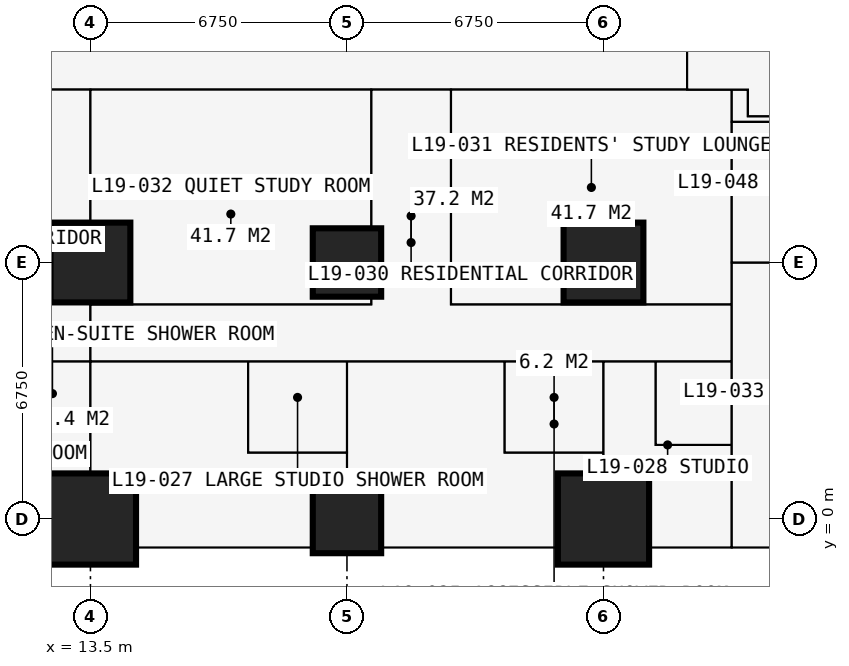
"""IFC4 building model, lengths in metres.
Left out: names, types, materials, properties, quantities, classifications, styles, units other than length and angle.
Written with IfcOpenShell. Run it as: python <this file> out.ifc"""

import sys

from ifc_helpers import new_model, si_unit, direction, frame, frame_2d, origin, origin_2d, place, context, subcontext, project, spatial, rectangle, extrude, element, fill, save


model = new_model("IFC4")
c1 = context("Model", 3, precision=1e-05, world=origin(), true_north=direction((0.0, 1.0)))
c2 = subcontext(c1, "Body", "Model", "MODEL_VIEW")
j1 = project(units=[si_unit("LENGTHUNIT", "METRE"), si_unit("PLANEANGLEUNIT", "RADIAN")], contexts=[c1])
p1 = place(None, origin())
s1 = spatial("IfcSite", under=j1, at=p1, CompositionType="ELEMENT")
p2 = place(p1, origin())
s2 = spatial("IfcBuilding", under=s1, at=p2, CompositionType="ELEMENT")
p3 = place(p2, frame((0.0, 0.0, 72.0)))
s3 = spatial("IfcBuildingStorey", under=s2, at=p3, CompositionType="ELEMENT", Elevation=72.0)
p4 = place(p3, frame((13.5, 0.0, 0.0), z_axis=(0.0, 0.0, 1.0), x_axis=(1.0, 0.0, 0.0)))
e1 = element("IfcColumn", 1, at=p4, inside=s3, PredefinedType="COLUMN", context=c2, shape_type="SweptSolid", body=[
    extrude(rectangle(XDim=2.4, YDim=2.4, at=origin_2d()), origin(), (0.0, 0.0, 1.0), 3.6),
])
p5 = place(p3, frame((13.5, 6.75, 0.0), z_axis=(0.0, 0.0, 1.0), x_axis=(1.0, 0.0, 0.0)))
e2 = element("IfcColumn", 2, at=p5, inside=s3, PredefinedType="COLUMN", context=c2, shape_type="SweptSolid", body=[
    extrude(rectangle(XDim=2.1, YDim=2.1, at=origin_2d()), origin(), (0.0, 0.0, 1.0), 3.6),
])
for number, where, z_axis, x_axis in (
    (3, (20.25, 0.0, 0.0), (0.0, 0.0, 1.0), (1.0, 0.0, 0.0)),
    (4, (20.25, 6.75, 0.0), (0.0, 0.0, 1.0), (1.0, 0.0, 0.0)),
):
    element("IfcColumn", number, at=place(p3, frame(where, z_axis=z_axis, x_axis=x_axis)), inside=s3, PredefinedType="COLUMN", context=c2, shape_type="SweptSolid", body=[
        extrude(rectangle(XDim=1.8, YDim=1.8, at=origin_2d()), origin(), (0.0, 0.0, 1.0), 3.6),
    ])
p6 = place(p3, frame((27.0, 0.0, 0.0), z_axis=(0.0, 0.0, 1.0), x_axis=(1.0, 0.0, 0.0)))
e5 = element("IfcColumn", 5, at=p6, inside=s3, PredefinedType="COLUMN", context=c2, shape_type="SweptSolid", body=[
    extrude(rectangle(XDim=2.4, YDim=2.4, at=origin_2d()), origin(), (0.0, 0.0, 1.0), 3.6),
])
p7 = place(p3, frame((27.0, 6.75, 0.0), z_axis=(0.0, 0.0, 1.0), x_axis=(1.0, 0.0, 0.0)))
e6 = element("IfcColumn", 6, at=p7, inside=s3, PredefinedType="COLUMN", context=c2, shape_type="SweptSolid", body=[
    extrude(rectangle(XDim=2.1, YDim=2.1, at=origin_2d()), origin(), (0.0, 0.0, 1.0), 3.6),
])
p8 = place(p3, frame((27.0, -0.75, 0.0), z_axis=(0.0, 0.0, 1.0), x_axis=(-1.0, 0.0, 0.0)))
e7 = element("IfcWall", 7, at=p8, inside=s3, PredefinedType="SOLIDWALL", context=c2, shape_type="SweptSolid", body=[
    extrude(rectangle(XDim=6.75, YDim=0.15, at=frame_2d((3.375, 0.0))), origin(), (0.0, 0.0, 1.0), 3.3),
])
p9 = place(p8, frame((1.262, 0.0, 0.0)))
e8 = element("IfcOpeningElement", 8, at=p9, cuts=e7, PredefinedType="OPENING", context=c2, shape_type="SweptSolid", body=[
    extrude(rectangle(XDim=1.0, YDim=2.2, at=frame_2d((0.5, 1.1))), frame((0.0, 0.085, 0.0), z_axis=(0.0, -1.0, 0.0), x_axis=(1.0, 0.0, 0.0)), (0.0, 0.0, 1.0), 0.17),
])
p10 = place(p8, frame((2.325, 0.0, 0.9)))
e9 = element("IfcOpeningElement", 9, at=p10, cuts=e7, PredefinedType="OPENING", context=c2, shape_type="SweptSolid", body=[
    extrude(rectangle(XDim=0.9, YDim=1.8, at=frame_2d((0.45, 0.9))), frame((0.0, 0.085, 0.0), z_axis=(0.0, -1.0, 0.0), x_axis=(1.0, 0.0, 0.0)), (0.0, 0.0, 1.0), 0.17),
])
p11 = place(p8, frame((4.788, 0.0, 0.0)))
e10 = element("IfcOpeningElement", 10, at=p11, cuts=e7, PredefinedType="OPENING", context=c2, shape_type="SweptSolid", body=[
    extrude(rectangle(XDim=1.0, YDim=2.2, at=frame_2d((0.5, 1.1))), frame((0.0, 0.085, 0.0), z_axis=(0.0, -1.0, 0.0), x_axis=(1.0, 0.0, 0.0)), (0.0, 0.0, 1.0), 0.17),
])
p12 = place(p8, frame((3.525, 0.0, 0.9)))
e11 = element("IfcOpeningElement", 11, at=p12, cuts=e7, PredefinedType="OPENING", context=c2, shape_type="SweptSolid", body=[
    extrude(rectangle(XDim=1.2, YDim=1.8, at=frame_2d((0.6, 0.9))), frame((0.0, 0.085, 0.0), z_axis=(0.0, -1.0, 0.0), x_axis=(1.0, 0.0, 0.0)), (0.0, 0.0, 1.0), 0.17),
])
p13 = place(p3, frame((23.625, -0.85, 0.0), z_axis=(0.0, 0.0, 1.0), x_axis=(0.0, -1.0, 0.0)))
e12 = element("IfcWall", 12, at=p13, inside=s3, PredefinedType="USERDEFINED", context=c2, shape_type="SweptSolid", body=[
    extrude(rectangle(XDim=2.2, YDim=1.0, at=frame_2d((1.1, 0.0))), origin(), (0.0, 0.0, 1.0), 0.9),
])
p14 = place(p3, frame((6.75, 4.15, 0.0), z_axis=(0.0, 0.0, 1.0), x_axis=(1.0, 0.0, 0.0)))
e13 = element("IfcWall", 13, at=p14, inside=s3, PredefinedType="PARTITIONING", context=c2, shape_type="SweptSolid", body=[
    extrude(rectangle(XDim=23.625, YDim=0.1, at=frame_2d((11.812, 0.0))), origin(), (0.0, 0.0, 1.0), 3.3),
])
p15 = place(p14, frame((0.2, 0.0, 0.0)))
e14 = element("IfcOpeningElement", 14, at=p15, cuts=e13, PredefinedType="OPENING", context=c2, shape_type="SweptSolid", body=[
    extrude(rectangle(XDim=0.95, YDim=2.2, at=frame_2d((0.475, 1.1))), frame((0.0, 0.06, 0.0), z_axis=(0.0, -1.0, 0.0), x_axis=(1.0, 0.0, 0.0)), (0.0, 0.0, 1.0), 0.12),
])
p16 = place(p14, frame((3.625, 0.0, 0.0)))
e15 = element("IfcOpeningElement", 15, at=p16, cuts=e13, PredefinedType="OPENING", context=c2, shape_type="SweptSolid", body=[
    extrude(rectangle(XDim=0.95, YDim=2.2, at=frame_2d((0.475, 1.1))), frame((0.0, 0.06, 0.0), z_axis=(0.0, -1.0, 0.0), x_axis=(1.0, 0.0, 0.0)), (0.0, 0.0, 1.0), 0.12),
])
p17 = place(p14, frame((15.1, 0.0, 0.0)))
e16 = element("IfcOpeningElement", 16, at=p17, cuts=e13, PredefinedType="OPENING", context=c2, shape_type="SweptSolid", body=[
    extrude(rectangle(XDim=0.95, YDim=2.2, at=frame_2d((0.475, 1.1))), frame((0.0, 0.06, 0.0), z_axis=(0.0, -1.0, 0.0), x_axis=(1.0, 0.0, 0.0)), (0.0, 0.0, 1.0), 0.12),
])
p18 = place(p14, frame((8.35, 0.0, 0.0)))
e17 = element("IfcOpeningElement", 17, at=p18, cuts=e13, PredefinedType="OPENING", context=c2, shape_type="SweptSolid", body=[
    extrude(rectangle(XDim=0.95, YDim=2.2, at=frame_2d((0.475, 1.1))), frame((0.0, 0.06, 0.0), z_axis=(0.0, -1.0, 0.0), x_axis=(1.0, 0.0, 0.0)), (0.0, 0.0, 1.0), 0.12),
])
p19 = place(p14, frame((20.5, 0.0, 0.0)))
e18 = element("IfcOpeningElement", 18, at=p19, cuts=e13, PredefinedType="OPENING", context=c2, shape_type="SweptSolid", body=[
    extrude(rectangle(XDim=0.95, YDim=2.2, at=frame_2d((0.475, 1.1))), frame((0.0, 0.06, 0.0), z_axis=(0.0, -1.0, 0.0), x_axis=(1.0, 0.0, 0.0)), (0.0, 0.0, 1.0), 0.12),
])
p20 = place(p3, frame((10.125, 11.3, 0.0), z_axis=(0.0, 0.0, 1.0), x_axis=(1.0, 0.0, 0.0)))
e19 = element("IfcWall", 19, at=p20, inside=s3, PredefinedType="PARTITIONING", context=c2, shape_type="SweptSolid", body=[
    extrude(rectangle(XDim=20.675, YDim=0.15, at=frame_2d((10.337, 0.0))), origin(), (0.0, 0.0, 1.0), 3.3),
])
p21 = place(p20, frame((1.775, 0.0, 0.0)))
e20 = element("IfcOpeningElement", 20, at=p21, cuts=e19, PredefinedType="OPENING", context=c2, shape_type="SweptSolid", body=[
    extrude(rectangle(XDim=1.0, YDim=2.2, at=frame_2d((0.5, 1.1))), frame((0.0, 0.085, 0.0), z_axis=(0.0, -1.0, 0.0), x_axis=(1.0, 0.0, 0.0)), (0.0, 0.0, 1.0), 0.17),
])
p22 = place(p20, frame((11.312, 0.0, 0.0)))
e21 = element("IfcOpeningElement", 21, at=p22, cuts=e19, PredefinedType="OPENING", context=c2, shape_type="SweptSolid", body=[
    extrude(rectangle(XDim=1.0, YDim=2.2, at=frame_2d((0.5, 1.1))), frame((0.0, 0.085, 0.0), z_axis=(0.0, -1.0, 0.0), x_axis=(1.0, 0.0, 0.0)), (0.0, 0.0, 1.0), 0.17),
])
p23 = place(p3, frame((11.5, 1.95, 0.0), z_axis=(0.0, 0.0, 1.0), x_axis=(1.0, 0.0, 0.0)))
e22 = element("IfcWall", 22, at=p23, inside=s3, PredefinedType="PARTITIONING", context=c2, shape_type="SweptSolid", body=[
    extrude(rectangle(XDim=2.0, YDim=0.1, at=frame_2d((1.0, 0.0))), origin(), (0.0, 0.0, 1.0), 3.3),
])
p24 = place(p3, frame((13.5, -0.734, 0.0), z_axis=(0.0, 0.0, 1.0), x_axis=(0.0, 1.0, 0.0)))
e23 = element("IfcWall", 23, at=p24, inside=s3, PredefinedType="PARTITIONING", context=c2, shape_type="SweptSolid", body=[
    extrude(rectangle(XDim=12.034, YDim=0.15, at=frame_2d((6.017, 0.0))), origin(), (0.0, 0.0, 1.0), 2.802),
])
p25 = place(p3, frame((13.5, 5.65, 0.0), z_axis=(0.0, 0.0, 1.0), x_axis=(1.0, 0.0, 0.0)))
e24 = element("IfcWall", 24, at=p25, inside=s3, PredefinedType="PARTITIONING", context=c2, shape_type="SweptSolid", body=[
    extrude(rectangle(XDim=7.387, YDim=0.15, at=frame_2d((3.694, 0.0))), origin(), (0.0, 0.0, 1.0), 3.3),
])
p26 = place(p25, frame((3.2, 0.0, 0.0)))
e25 = element("IfcOpeningElement", 25, at=p26, cuts=e24, PredefinedType="OPENING", context=c2, shape_type="SweptSolid", body=[
    extrude(rectangle(XDim=0.95, YDim=2.2, at=frame_2d((0.475, 1.1))), frame((0.0, 0.085, 0.0), z_axis=(0.0, -1.0, 0.0), x_axis=(1.0, 0.0, 0.0)), (0.0, 0.0, 1.0), 0.17),
])
p27 = place(p3, frame((17.65, 1.75, 0.0), z_axis=(0.0, 0.0, 1.0), x_axis=(0.0, 1.0, 0.0)))
e26 = element("IfcWall", 26, at=p27, inside=s3, PredefinedType="PARTITIONING", context=c2, shape_type="SweptSolid", body=[
    extrude(rectangle(XDim=2.4, YDim=0.1, at=frame_2d((1.2, 0.0))), origin(), (0.0, 0.0, 1.0), 3.3),
])
p28 = place(p3, frame((17.65, 1.75, 0.0), z_axis=(0.0, 0.0, 1.0), x_axis=(1.0, 0.0, 0.0)))
e27 = element("IfcWall", 27, at=p28, inside=s3, PredefinedType="PARTITIONING", context=c2, shape_type="SweptSolid", body=[
    extrude(rectangle(XDim=2.6, YDim=0.1, at=frame_2d((1.3, 0.0))), origin(), (0.0, 0.0, 1.0), 3.3),
])
p29 = place(p3, frame((20.25, -0.734, 0.0), z_axis=(0.0, 0.0, 1.0), x_axis=(0.0, 1.0, 0.0)))
e28 = element("IfcWall", 28, at=p29, inside=s3, PredefinedType="PARTITIONING", context=c2, shape_type="SweptSolid", body=[
    extrude(rectangle(XDim=4.884, YDim=0.175, at=frame_2d((2.442, 0.0))), origin(), (0.0, 0.0, 1.0), 2.802),
])
p30 = place(p29, frame((3.234, 0.0, 0.0)))
e29 = element("IfcOpeningElement", 29, at=p30, cuts=e28, PredefinedType="OPENING", context=c2, shape_type="SweptSolid", body=[
    extrude(rectangle(XDim=0.9, YDim=2.2, at=frame_2d((0.45, 1.1))), frame((0.0, 0.097, 0.0), z_axis=(0.0, -1.0, 0.0), x_axis=(1.0, 0.0, 0.0)), (0.0, 0.0, 1.0), 0.195),
])
p31 = place(p3, frame((20.887, 5.65, 0.0), z_axis=(0.0, 0.0, 1.0), x_axis=(0.0, 1.0, 0.0)))
e30 = element("IfcWall", 30, at=p31, inside=s3, PredefinedType="PARTITIONING", context=c2, shape_type="SweptSolid", body=[
    extrude(rectangle(XDim=5.65, YDim=0.15, at=frame_2d((2.825, 0.0))), origin(), (0.0, 0.0, 1.0), 3.3),
])
p32 = place(p3, frame((22.988, 5.65, 0.0), z_axis=(0.0, 0.0, 1.0), x_axis=(1.0, 0.0, 0.0)))
e31 = element("IfcWall", 31, at=p32, inside=s3, PredefinedType="PARTITIONING", context=c2, shape_type="SweptSolid", body=[
    extrude(rectangle(XDim=7.387, YDim=0.15, at=frame_2d((3.694, 0.0))), origin(), (0.0, 0.0, 1.0), 3.3),
])
p33 = place(p32, frame((2.0, 0.0, 0.0)))
e32 = element("IfcOpeningElement", 32, at=p33, cuts=e31, PredefinedType="OPENING", context=c2, shape_type="SweptSolid", body=[
    extrude(rectangle(XDim=0.95, YDim=2.2, at=frame_2d((0.475, 1.1))), frame((0.0, 0.085, 0.0), z_axis=(0.0, -1.0, 0.0), x_axis=(1.0, 0.0, 0.0)), (0.0, 0.0, 1.0), 0.17),
])
p34 = place(p3, frame((22.988, 5.65, 0.0), z_axis=(0.0, 0.0, 1.0), x_axis=(0.0, 1.0, 0.0)))
e33 = element("IfcWall", 33, at=p34, inside=s3, PredefinedType="PARTITIONING", context=c2, shape_type="SweptSolid", body=[
    extrude(rectangle(XDim=5.65, YDim=0.15, at=frame_2d((2.825, 0.0))), origin(), (0.0, 0.0, 1.0), 3.3),
])
p35 = place(p3, frame((24.4, 1.75, 0.0), z_axis=(0.0, 0.0, 1.0), x_axis=(0.0, 1.0, 0.0)))
e34 = element("IfcWall", 34, at=p35, inside=s3, PredefinedType="PARTITIONING", context=c2, shape_type="SweptSolid", body=[
    extrude(rectangle(XDim=2.4, YDim=0.1, at=frame_2d((1.2, 0.0))), origin(), (0.0, 0.0, 1.0), 3.3),
])
p36 = place(p3, frame((24.4, 1.75, 0.0), z_axis=(0.0, 0.0, 1.0), x_axis=(1.0, 0.0, 0.0)))
e35 = element("IfcWall", 35, at=p36, inside=s3, PredefinedType="PARTITIONING", context=c2, shape_type="SweptSolid", body=[
    extrude(rectangle(XDim=2.6, YDim=0.1, at=frame_2d((1.3, 0.0))), origin(), (0.0, 0.0, 1.0), 3.3),
])
p37 = place(p36, frame((0.5, 0.0, 0.0)))
e36 = element("IfcOpeningElement", 36, at=p37, cuts=e35, PredefinedType="OPENING", context=c2, shape_type="SweptSolid", body=[
    extrude(rectangle(XDim=0.9, YDim=2.2, at=frame_2d((0.45, 1.1))), frame((0.0, 0.06, 0.0), z_axis=(0.0, -1.0, 0.0), x_axis=(1.0, 0.0, 0.0)), (0.0, 0.0, 1.0), 0.12),
])
p38 = place(p3, frame((27.0, -0.734, 0.0), z_axis=(0.0, 0.0, 1.0), x_axis=(0.0, 1.0, 0.0)))
e37 = element("IfcWall", 37, at=p38, inside=s3, PredefinedType="PARTITIONING", context=c2, shape_type="SweptSolid", body=[
    extrude(rectangle(XDim=4.884, YDim=0.175, at=frame_2d((2.442, 0.0))), origin(), (0.0, 0.0, 1.0), 2.802),
])
p39 = place(p3, frame((28.375, 1.95, 0.0), z_axis=(0.0, 0.0, 1.0), x_axis=(0.0, 1.0, 0.0)))
e38 = element("IfcWall", 38, at=p39, inside=s3, PredefinedType="PARTITIONING", context=c2, shape_type="SweptSolid", body=[
    extrude(rectangle(XDim=2.2, YDim=0.1, at=frame_2d((1.1, 0.0))), origin(), (0.0, 0.0, 1.0), 3.3),
])
p40 = place(p39, frame((0.65, 0.0, 0.0)))
e39 = element("IfcOpeningElement", 39, at=p40, cuts=e38, PredefinedType="OPENING", context=c2, shape_type="SweptSolid", body=[
    extrude(rectangle(XDim=0.9, YDim=2.2, at=frame_2d((0.45, 1.1))), frame((0.0, 0.06, 0.0), z_axis=(0.0, -1.0, 0.0), x_axis=(1.0, 0.0, 0.0)), (0.0, 0.0, 1.0), 0.12),
])
p41 = place(p3, frame((28.375, 1.95, 0.0), z_axis=(0.0, 0.0, 1.0), x_axis=(1.0, 0.0, 0.0)))
e40 = element("IfcWall", 40, at=p41, inside=s3, PredefinedType="PARTITIONING", context=c2, shape_type="SweptSolid", body=[
    extrude(rectangle(XDim=2.0, YDim=0.1, at=frame_2d((1.0, 0.0))), origin(), (0.0, 0.0, 1.0), 3.3),
])
p42 = place(p3, frame((29.2, 11.3, 0.0), z_axis=(0.0, 0.0, 1.0), x_axis=(0.0, 1.0, 0.0)))
e41 = element("IfcWall", 41, at=p42, inside=s3, PredefinedType="PARTITIONING", context=c2, shape_type="SweptSolid", body=[
    extrude(rectangle(XDim=17.9, YDim=0.2, at=frame_2d((8.95, 0.0))), origin(), (0.0, 0.0, 1.0), 3.3),
])
p43 = place(p42, frame((8.35, 0.0, 0.0)))
e42 = element("IfcOpeningElement", 42, at=p43, cuts=e41, PredefinedType="OPENING", context=c2, shape_type="SweptSolid", body=[
    extrude(rectangle(XDim=1.2, YDim=2.2, at=frame_2d((0.6, 1.1))), frame((0.0, 0.11, 0.0), z_axis=(0.0, -1.0, 0.0), x_axis=(1.0, 0.0, 0.0)), (0.0, 0.0, 1.0), 0.22),
])
p44 = place(p3, frame((30.375, -0.734, 0.0), z_axis=(0.0, 0.0, 1.0), x_axis=(0.0, 1.0, 0.0)))
e43 = element("IfcWall", 43, at=p44, inside=s3, PredefinedType="PARTITIONING", context=c2, shape_type="SweptSolid", body=[
    extrude(rectangle(XDim=12.034, YDim=0.15, at=frame_2d((6.017, 0.0))), origin(), (0.0, 0.0, 1.0), 3.3),
])
p45 = place(p44, frame((5.134, 0.0, 0.0)))
e44 = element("IfcOpeningElement", 44, at=p45, cuts=e43, PredefinedType="OPENING", context=c2, shape_type="SweptSolid", body=[
    extrude(rectangle(XDim=1.0, YDim=2.2, at=frame_2d((0.5, 1.1))), frame((0.0, 0.085, 0.0), z_axis=(0.0, -1.0, 0.0), x_axis=(1.0, 0.0, 0.0)), (0.0, 0.0, 1.0), 0.17),
])
p46 = place(p3, frame((30.375, 6.75, 0.0), z_axis=(0.0, 0.0, 1.0), x_axis=(1.0, 0.0, 0.0)))
e45 = element("IfcWall", 45, at=p46, inside=s3, PredefinedType="PARTITIONING", context=c2, shape_type="SweptSolid", body=[
    extrude(rectangle(XDim=5.975, YDim=0.15, at=frame_2d((2.988, 0.0))), origin(), (0.0, 0.0, 1.0), 2.802),
])
p47 = place(p3, frame((30.375, 10.45, 0.0), z_axis=(0.0, 0.0, 1.0), x_axis=(1.0, 0.0, 0.0)))
e46 = element("IfcWall", 46, at=p47, inside=s3, PredefinedType="PARTITIONING", context=c2, shape_type="SweptSolid", body=[
    extrude(rectangle(XDim=4.475, YDim=0.15, at=frame_2d((2.238, 0.0))), origin(), (0.0, 0.0, 1.0), 3.3),
])
p48 = place(p47, frame((2.35, 0.0, 0.0)))
e47 = element("IfcOpeningElement", 47, at=p48, cuts=e46, PredefinedType="OPENING", context=c2, shape_type="SweptSolid", body=[
    extrude(rectangle(XDim=0.95, YDim=2.2, at=frame_2d((0.475, 1.1))), frame((0.0, 0.085, 0.0), z_axis=(0.0, -1.0, 0.0), x_axis=(1.0, 0.0, 0.0)), (0.0, 0.0, 1.0), 0.17),
])
p49 = place(p3, frame((30.8, 10.6, 0.0), z_axis=(0.0, 0.0, 1.0), x_axis=(0.0, 1.0, 0.0)))
e48 = element("IfcWall", 48, at=p49, inside=s3, PredefinedType="PARTITIONING", context=c2, shape_type="SweptSolid", body=[
    extrude(rectangle(XDim=0.7, YDim=0.15, at=frame_2d((0.35, 0.0))), origin(), (0.0, 0.0, 1.0), 3.3),
])
p50 = place(p3, frame((30.8, 10.6, 0.0), z_axis=(0.0, 0.0, 1.0), x_axis=(1.0, 0.0, 0.0)))
e49 = element("IfcWall", 49, at=p50, inside=s3, PredefinedType="PARTITIONING", context=c2, shape_type="SweptSolid", body=[
    extrude(rectangle(XDim=1.85, YDim=0.15, at=frame_2d((0.925, 0.0))), origin(), (0.0, 0.0, 1.0), 3.3),
])
p51 = place(p9, origin())
e50 = element("IfcDoor", 50, at=p51, inside=s3, OperationType="SINGLE_SWING_LEFT", PredefinedType="DOOR", context=c2, shape_type="SweptSolid", body=[
    extrude(rectangle(XDim=1.0, YDim=2.2, at=frame_2d((0.5, 1.1))), frame((0.0, 0.025, 0.0), z_axis=(0.0, -1.0, 0.0), x_axis=(1.0, 0.0, 0.0)), (0.0, 0.0, 1.0), 0.05),
])
fill(e8, e50)
p52 = place(p10, origin())
e51 = element("IfcWindow", 51, at=p52, inside=s3, PartitioningType="SINGLE_PANEL", PredefinedType="WINDOW", context=c2, shape_type="SweptSolid", body=[
    extrude(rectangle(XDim=0.9, YDim=1.8, at=frame_2d((0.45, 0.9))), frame((0.0, 0.03, 0.0), z_axis=(0.0, -1.0, 0.0), x_axis=(1.0, 0.0, 0.0)), (0.0, 0.0, 1.0), 0.06),
])
fill(e9, e51)
p53 = place(p11, origin())
e52 = element("IfcDoor", 52, at=p53, inside=s3, OperationType="SINGLE_SWING_RIGHT", PredefinedType="DOOR", context=c2, shape_type="SweptSolid", body=[
    extrude(rectangle(XDim=1.0, YDim=2.2, at=frame_2d((0.5, 1.1))), frame((0.0, 0.025, 0.0), z_axis=(0.0, -1.0, 0.0), x_axis=(1.0, 0.0, 0.0)), (0.0, 0.0, 1.0), 0.05),
])
fill(e10, e52)
p54 = place(p12, origin())
e53 = element("IfcWindow", 53, at=p54, inside=s3, PartitioningType="SINGLE_PANEL", PredefinedType="WINDOW", context=c2, shape_type="SweptSolid", body=[
    extrude(rectangle(XDim=1.2, YDim=1.8, at=frame_2d((0.6, 0.9))), frame((0.0, 0.03, 0.0), z_axis=(0.0, -1.0, 0.0), x_axis=(1.0, 0.0, 0.0)), (0.0, 0.0, 1.0), 0.06),
])
fill(e11, e53)
p55 = place(p21, origin())
e54 = element("IfcDoor", 54, at=p55, inside=s3, OperationType="SINGLE_SWING_LEFT", PredefinedType="DOOR", context=c2, shape_type="SweptSolid", body=[
    extrude(rectangle(XDim=1.0, YDim=2.2, at=frame_2d((0.5, 1.1))), frame((0.0, 0.025, 0.0), z_axis=(0.0, -1.0, 0.0), x_axis=(1.0, 0.0, 0.0)), (0.0, 0.0, 1.0), 0.05),
])
fill(e20, e54)
p56 = place(p17, origin())
e55 = element("IfcDoor", 55, at=p56, inside=s3, OperationType="SINGLE_SWING_LEFT", PredefinedType="DOOR", context=c2, shape_type="SweptSolid", body=[
    extrude(rectangle(XDim=0.95, YDim=2.2, at=frame_2d((0.475, 1.1))), frame((0.0, 0.025, 0.0), z_axis=(0.0, -1.0, 0.0), x_axis=(1.0, 0.0, 0.0)), (0.0, 0.0, 1.0), 0.05),
])
fill(e16, e55)
p57 = place(p37, origin())
e56 = element("IfcDoor", 56, at=p57, inside=s3, OperationType="SINGLE_SWING_RIGHT", PredefinedType="DOOR", context=c2, shape_type="SweptSolid", body=[
    extrude(rectangle(XDim=0.9, YDim=2.2, at=frame_2d((0.45, 1.1))), frame((0.0, 0.025, 0.0), z_axis=(0.0, -1.0, 0.0), x_axis=(1.0, 0.0, 0.0)), (0.0, 0.0, 1.0), 0.05),
])
fill(e36, e56)
p58 = place(p18, origin())
e57 = element("IfcDoor", 57, at=p58, inside=s3, OperationType="SINGLE_SWING_LEFT", PredefinedType="DOOR", context=c2, shape_type="SweptSolid", body=[
    extrude(rectangle(XDim=0.95, YDim=2.2, at=frame_2d((0.475, 1.1))), frame((0.0, 0.025, 0.0), z_axis=(0.0, -1.0, 0.0), x_axis=(1.0, 0.0, 0.0)), (0.0, 0.0, 1.0), 0.05),
])
fill(e17, e57)
p59 = place(p30, origin())
e58 = element("IfcDoor", 58, at=p59, inside=s3, OperationType="SINGLE_SWING_RIGHT", PredefinedType="DOOR", context=c2, shape_type="SweptSolid", body=[
    extrude(rectangle(XDim=0.9, YDim=2.2, at=frame_2d((0.45, 1.1))), frame((0.0, 0.025, 0.0), z_axis=(0.0, -1.0, 0.0), x_axis=(1.0, 0.0, 0.0)), (0.0, 0.0, 1.0), 0.05),
])
fill(e29, e58)
p60 = place(p19, origin())
e59 = element("IfcDoor", 59, at=p60, inside=s3, OperationType="SINGLE_SWING_LEFT", PredefinedType="DOOR", context=c2, shape_type="SweptSolid", body=[
    extrude(rectangle(XDim=0.95, YDim=2.2, at=frame_2d((0.475, 1.1))), frame((0.0, 0.025, 0.0), z_axis=(0.0, -1.0, 0.0), x_axis=(1.0, 0.0, 0.0)), (0.0, 0.0, 1.0), 0.05),
])
fill(e18, e59)
p61 = place(p40, origin())
e60 = element("IfcDoor", 60, at=p61, inside=s3, OperationType="SINGLE_SWING_RIGHT", PredefinedType="DOOR", context=c2, shape_type="SweptSolid", body=[
    extrude(rectangle(XDim=0.9, YDim=2.2, at=frame_2d((0.45, 1.1))), frame((0.0, 0.025, 0.0), z_axis=(0.0, -1.0, 0.0), x_axis=(1.0, 0.0, 0.0)), (0.0, 0.0, 1.0), 0.05),
])
fill(e39, e60)
p62 = place(p22, origin())
e61 = element("IfcDoor", 61, at=p62, inside=s3, OperationType="SINGLE_SWING_LEFT", PredefinedType="DOOR", context=c2, shape_type="SweptSolid", body=[
    extrude(rectangle(XDim=1.0, YDim=2.2, at=frame_2d((0.5, 1.1))), frame((0.0, 0.025, 0.0), z_axis=(0.0, -1.0, 0.0), x_axis=(1.0, 0.0, 0.0)), (0.0, 0.0, 1.0), 0.05),
])
fill(e21, e61)
p63 = place(p33, origin())
e62 = element("IfcDoor", 62, at=p63, inside=s3, OperationType="SINGLE_SWING_LEFT", PredefinedType="DOOR", context=c2, shape_type="SweptSolid", body=[
    extrude(rectangle(XDim=0.95, YDim=2.2, at=frame_2d((0.475, 1.1))), frame((0.0, 0.025, 0.0), z_axis=(0.0, -1.0, 0.0), x_axis=(1.0, 0.0, 0.0)), (0.0, 0.0, 1.0), 0.05),
])
fill(e32, e62)
p64 = place(p26, origin())
e63 = element("IfcDoor", 63, at=p64, inside=s3, OperationType="SINGLE_SWING_LEFT", PredefinedType="DOOR", context=c2, shape_type="SweptSolid", body=[
    extrude(rectangle(XDim=0.95, YDim=2.2, at=frame_2d((0.475, 1.1))), frame((0.0, 0.025, 0.0), z_axis=(0.0, -1.0, 0.0), x_axis=(1.0, 0.0, 0.0)), (0.0, 0.0, 1.0), 0.05),
])
fill(e25, e63)
p65 = place(p45, origin())
e64 = element("IfcDoor", 64, at=p65, inside=s3, OperationType="SINGLE_SWING_LEFT", PredefinedType="DOOR", context=c2, shape_type="SweptSolid", body=[
    extrude(rectangle(XDim=1.0, YDim=2.2, at=frame_2d((0.5, 1.1))), frame((0.0, 0.025, 0.0), z_axis=(0.0, -1.0, 0.0), x_axis=(1.0, 0.0, 0.0)), (0.0, 0.0, 1.0), 0.05),
])
fill(e44, e64)
save(model, sys.argv[1])
